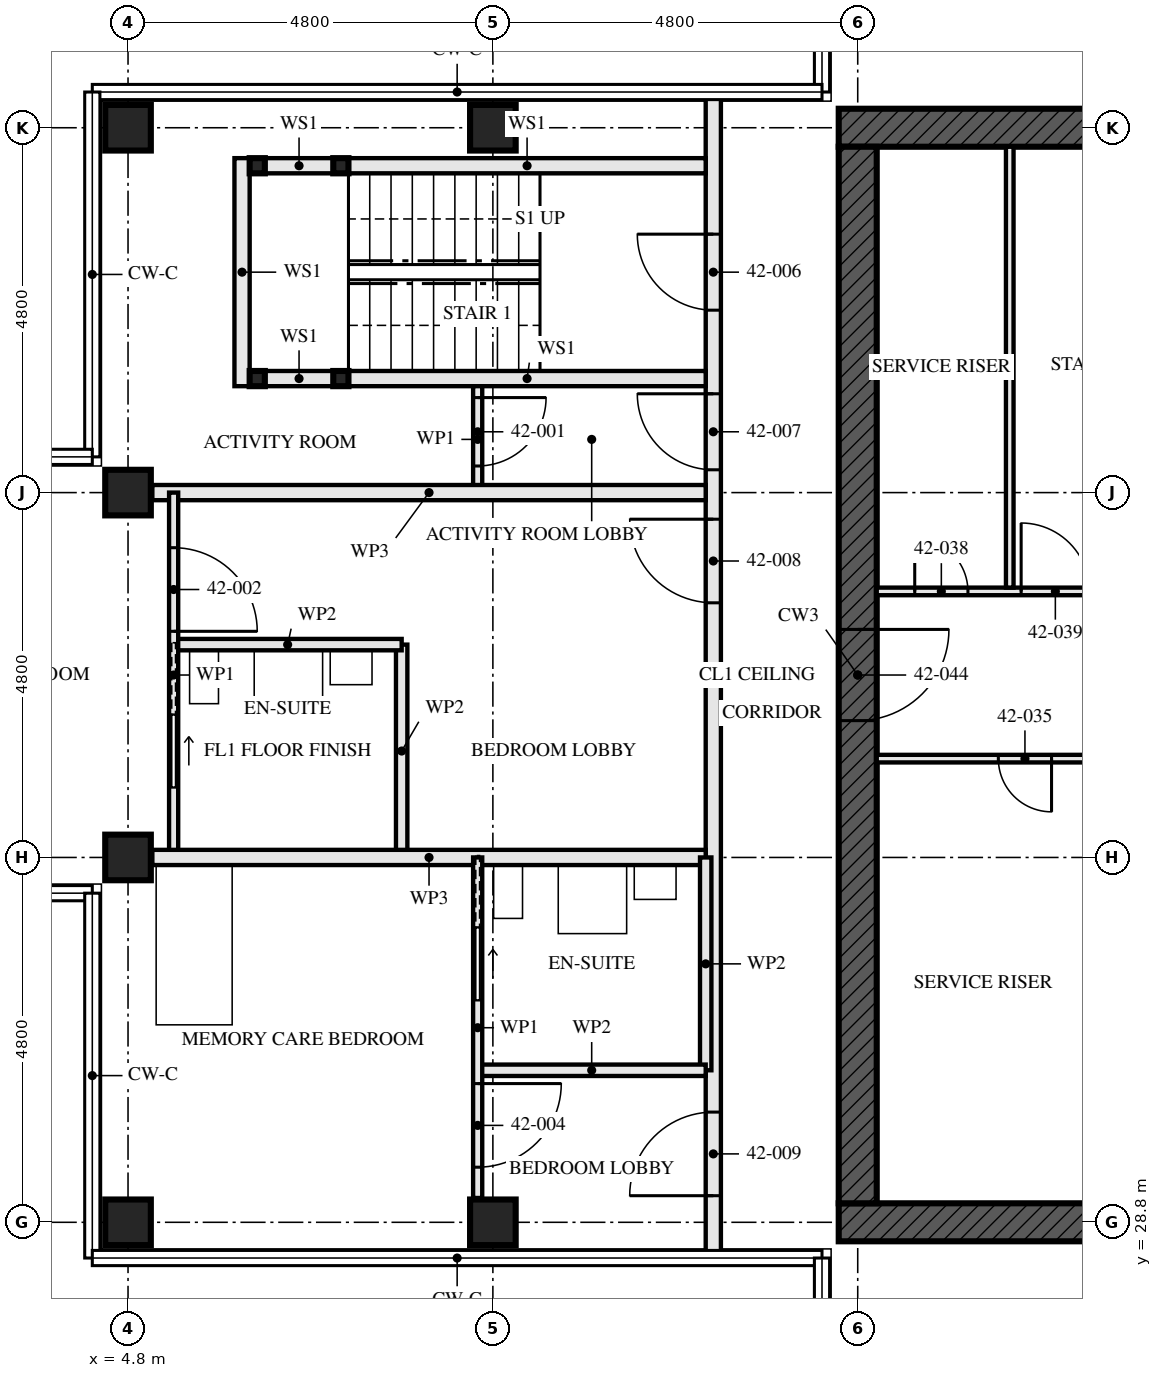
"""IFC4 building model, lengths in metres.
Left out: names, types, materials, properties, quantities, classifications, styles, units other than length and angle.
Written with IfcOpenShell. Run it as: python <this file> out.ifc"""

import sys

from ifc_helpers import new_model, si_unit, direction, frame, frame_2d, origin, origin_2d, place, context, subcontext, project, spatial, rectangle, hollow_rectangle, extrude, element, fill, save


model = new_model("IFC4")
c1 = context("Model", 3, precision=1e-05, world=origin(), true_north=direction((0.0, 1.0)))
c2 = subcontext(c1, "Body", "Model", "MODEL_VIEW")
j1 = project(units=[si_unit("LENGTHUNIT", "METRE"), si_unit("PLANEANGLEUNIT", "RADIAN")], contexts=[c1])
p1 = place(None, origin())
s1 = spatial("IfcSite", under=j1, at=p1, CompositionType="ELEMENT")
p2 = place(p1, origin())
s2 = spatial("IfcBuilding", under=s1, at=p2, CompositionType="ELEMENT")
p3 = place(p2, frame((0.0, 0.0, 155.0)))
s3 = spatial("IfcBuildingStorey", under=s2, at=p3, CompositionType="ELEMENT", Elevation=155.0)
for number, where, z_axis, x_axis in (
    (1, (4.8, 28.8, 0.0), (0.0, 0.0, 1.0), (0.0, 1.0, 0.0)),
    (2, (4.8, 33.6, 0.0), (0.0, 0.0, 1.0), (0.0, 1.0, 0.0)),
    (3, (4.8, 38.4, 0.0), (0.0, 0.0, 1.0), (0.0, 1.0, 0.0)),
    (4, (4.8, 43.2, 0.0), (0.0, 0.0, 1.0), (0.0, 1.0, 0.0)),
):
    element("IfcColumn", number, at=place(p3, frame(where, z_axis=z_axis, x_axis=x_axis)), inside=s3, PredefinedType="COLUMN", context=c2, shape_type="SweptSolid", body=[
        extrude(hollow_rectangle(XDim=0.6, YDim=0.6, WallThickness=0.06, at=origin_2d()), origin(), (0.0, 0.0, 1.0), 3.5),
    ])
for number, where, z_axis, x_axis in (
    (5, (9.6, 28.8, 0.0), (0.0, 0.0, 1.0), (0.0, 1.0, 0.0)),
    (6, (9.6, 43.2, 0.0), (0.0, 0.0, 1.0), (0.0, 1.0, 0.0)),
):
    element("IfcColumn", number, at=place(p3, frame(where, z_axis=z_axis, x_axis=x_axis)), inside=s3, PredefinedType="COLUMN", context=c2, shape_type="SweptSolid", body=[
        extrude(hollow_rectangle(XDim=0.6, YDim=0.6, WallThickness=0.08, at=origin_2d()), origin(), (0.0, 0.0, 1.0), 3.5),
    ])
p4 = place(p3, frame((14.15, 28.8, -0.17), z_axis=(0.0, 0.0, 1.0), x_axis=(1.0, 0.0, 0.0)))
e7 = element("IfcWall", 7, at=p4, inside=s3, PredefinedType="SHEAR", context=c2, shape_type="SweptSolid", body=[
    extrude(rectangle(XDim=14.9, YDim=0.5, at=frame_2d((7.45, 0.0))), origin(), (0.0, 0.0, 1.0), 3.5),
])
p5 = place(p4, frame((6.85, 0.0, 0.17)))
e8 = element("IfcOpeningElement", 8, at=p5, cuts=e7, PredefinedType="OPENING", context=c2, shape_type="SweptSolid", body=[
    extrude(rectangle(XDim=1.2, YDim=2.1, at=frame_2d((0.6, 1.05))), frame((0.0, 0.26, 0.0), z_axis=(0.0, -1.0, 0.0), x_axis=(1.0, 0.0, 0.0)), (0.0, 0.0, 1.0), 0.521),
])
p6 = place(p3, frame((29.05, 43.2, -0.17), z_axis=(0.0, 0.0, 1.0), x_axis=(-1.0, 0.0, 0.0)))
e9 = element("IfcWall", 9, at=p6, inside=s3, PredefinedType="SHEAR", context=c2, shape_type="SweptSolid", body=[
    extrude(rectangle(XDim=14.9, YDim=0.5, at=frame_2d((7.45, 0.0))), origin(), (0.0, 0.0, 1.0), 3.5),
])
p7 = place(p6, frame((6.85, 0.0, 0.17)))
e10 = element("IfcOpeningElement", 10, at=p7, cuts=e9, PredefinedType="OPENING", context=c2, shape_type="SweptSolid", body=[
    extrude(rectangle(XDim=1.2, YDim=2.1, at=frame_2d((0.6, 1.05))), frame((0.0, 0.26, 0.0), z_axis=(0.0, -1.0, 0.0), x_axis=(1.0, 0.0, 0.0)), (0.0, 0.0, 1.0), 0.521),
])
p8 = place(p3, frame((14.4, 42.95, -0.17), z_axis=(0.0, 0.0, 1.0), x_axis=(0.0, -1.0, 0.0)))
e11 = element("IfcWall", 11, at=p8, inside=s3, PredefinedType="SHEAR", context=c2, shape_type="SweptSolid", body=[
    extrude(rectangle(XDim=13.9, YDim=0.5, at=frame_2d((6.95, 0.0))), origin(), (0.0, 0.0, 1.0), 3.5),
])
p9 = place(p8, frame((6.35, 0.0, 0.17)))
e12 = element("IfcOpeningElement", 12, at=p9, cuts=e11, PredefinedType="OPENING", context=c2, shape_type="SweptSolid", body=[
    extrude(rectangle(XDim=1.2, YDim=2.1, at=frame_2d((0.6, 1.05))), frame((0.0, 0.26, 0.0), z_axis=(0.0, -1.0, 0.0), x_axis=(1.0, 0.0, 0.0)), (0.0, 0.0, 1.0), 0.521),
])
for number, where, z_axis, x_axis in (
    (13, (6.5, 42.7, 0.0), (0.0, 0.0, 1.0), (1.0, 0.0, 0.0)),
    (14, (6.5, 39.9, 0.0), (0.0, 0.0, 1.0), (1.0, 0.0, 0.0)),
    (15, (7.6, 42.7, 0.0), (0.0, 0.0, 1.0), (1.0, 0.0, 0.0)),
    (16, (7.6, 39.9, 0.0), (0.0, 0.0, 1.0), (1.0, 0.0, 0.0)),
):
    element("IfcColumn", number, at=place(p3, frame(where, z_axis=z_axis, x_axis=x_axis)), inside=s3, PredefinedType="COLUMN", context=c2, shape_type="SweptSolid", body=[
        extrude(hollow_rectangle(XDim=0.2, YDim=0.2, WallThickness=0.008, at=origin_2d()), origin(), (0.0, 0.0, 1.0), 3.33),
    ])
p10 = place(p3, frame((6.6, 42.7, 0.0), z_axis=(0.0, 0.0, 1.0), x_axis=(1.0, 0.0, 0.0)))
e17 = element("IfcWall", 17, at=p10, inside=s3, PredefinedType="SOLIDWALL", context=c2, shape_type="SweptSolid", body=[
    extrude(rectangle(XDim=0.9, YDim=0.2, at=frame_2d((0.45, 0.0))), origin(), (0.0, 0.0, 1.0), 2.99),
])
p11 = place(p3, frame((7.7, 42.7, 0.0), z_axis=(0.0, 0.0, 1.0), x_axis=(1.0, 0.0, 0.0)))
e18 = element("IfcWall", 18, at=p11, inside=s3, PredefinedType="SOLIDWALL", context=c2, shape_type="SweptSolid", body=[
    extrude(rectangle(XDim=4.7, YDim=0.2, at=frame_2d((2.35, 0.0))), origin(), (0.0, 0.0, 1.0), 2.99),
])
p12 = place(p3, frame((6.6, 39.9, 0.0), z_axis=(0.0, 0.0, 1.0), x_axis=(1.0, 0.0, 0.0)))
e19 = element("IfcWall", 19, at=p12, inside=s3, PredefinedType="SOLIDWALL", context=c2, shape_type="SweptSolid", body=[
    extrude(rectangle(XDim=0.9, YDim=0.2, at=frame_2d((0.45, 0.0))), origin(), (0.0, 0.0, 1.0), 2.99),
])
p13 = place(p3, frame((7.7, 39.9, 0.0), z_axis=(0.0, 0.0, 1.0), x_axis=(1.0, 0.0, 0.0)))
e20 = element("IfcWall", 20, at=p13, inside=s3, PredefinedType="SOLIDWALL", context=c2, shape_type="SweptSolid", body=[
    extrude(rectangle(XDim=4.7, YDim=0.2, at=frame_2d((2.35, 0.0))), origin(), (0.0, 0.0, 1.0), 2.99),
])
p14 = place(p3, frame((6.3, 42.8, 0.0), z_axis=(0.0, 0.0, 1.0), x_axis=(0.0, -1.0, 0.0)))
e21 = element("IfcWall", 21, at=p14, inside=s3, PredefinedType="SOLIDWALL", context=c2, shape_type="SweptSolid", body=[
    extrude(rectangle(XDim=3.0, YDim=0.2, at=frame_2d((1.5, 0.0))), origin(), (0.0, 0.0, 1.0), 3.33),
])
p15 = place(p3, frame((9.4, 39.8, 0.0), z_axis=(0.0, 0.0, 1.0), x_axis=(0.0, -1.0, 0.0)))
e22 = element("IfcWall", 22, at=p15, inside=s3, PredefinedType="PARTITIONING", context=c2, shape_type="SweptSolid", body=[
    extrude(rectangle(XDim=1.4, YDim=0.12, at=frame_2d((0.7, 0.0))), origin(), (0.0, 0.0, 1.0), 3.33),
])
p16 = place(p15, frame((0.15, 0.0, 0.0)))
e23 = element("IfcOpeningElement", 23, at=p16, cuts=e22, PredefinedType="OPENING", context=c2, shape_type="SweptSolid", body=[
    extrude(rectangle(XDim=0.9, YDim=2.1, at=frame_2d((0.45, 1.05))), frame((0.0, 0.071, 0.0), z_axis=(0.0, -1.0, 0.0), x_axis=(1.0, 0.0, 0.0)), (0.0, 0.0, 1.0), 0.141),
])
p17 = place(p3, frame((5.12, 38.4, 0.0), z_axis=(0.0, 0.0, 1.0), x_axis=(1.0, 0.0, 0.0)))
e24 = element("IfcWall", 24, at=p17, inside=s3, PredefinedType="PARTITIONING", context=c2, shape_type="SweptSolid", body=[
    extrude(rectangle(XDim=7.28, YDim=0.2, at=frame_2d((3.64, 0.0))), origin(), (0.0, 0.0, 1.0), 2.55),
])
p18 = place(p3, frame((5.4, 36.4, 0.0), z_axis=(0.0, 0.0, 1.0), x_axis=(1.0, 0.0, 0.0)))
e25 = element("IfcWall", 25, at=p18, inside=s3, PredefinedType="PARTITIONING", context=c2, shape_type="SweptSolid", body=[
    extrude(rectangle(XDim=3.0, YDim=0.15, at=frame_2d((1.5, 0.0))), origin(), (0.0, 0.0, 1.0), 3.33),
])
p19 = place(p3, frame((8.4, 36.4, 0.0), z_axis=(0.0, 0.0, 1.0), x_axis=(0.0, -1.0, 0.0)))
e26 = element("IfcWall", 26, at=p19, inside=s3, PredefinedType="PARTITIONING", context=c2, shape_type="SweptSolid", body=[
    extrude(rectangle(XDim=2.8, YDim=0.15, at=frame_2d((1.4, 0.0))), origin(), (0.0, 0.0, 1.0), 3.33),
])
p20 = place(p3, frame((5.4, 38.4, 0.0), z_axis=(0.0, 0.0, 1.0), x_axis=(0.0, -1.0, 0.0)))
e27 = element("IfcWall", 27, at=p20, inside=s3, PredefinedType="PARTITIONING", context=c2, shape_type="SweptSolid", body=[
    extrude(rectangle(XDim=4.8, YDim=0.12, at=frame_2d((2.4, 0.0))), origin(), (0.0, 0.0, 1.0), 3.33),
])
p21 = place(p20, frame((0.725, 0.0, 0.0)))
e28 = element("IfcOpeningElement", 28, at=p21, cuts=e27, PredefinedType="OPENING", context=c2, shape_type="SweptSolid", body=[
    extrude(rectangle(XDim=1.1, YDim=2.1, at=frame_2d((0.55, 1.05))), frame((0.0, 0.071, 0.0), z_axis=(0.0, -1.0, 0.0), x_axis=(1.0, 0.0, 0.0)), (0.0, 0.0, 1.0), 0.141),
])
p22 = place(p20, frame((2.925, 0.0, 0.0)))
e29 = element("IfcOpeningElement", 29, at=p22, cuts=e27, PredefinedType="OPENING", context=c2, shape_type="SweptSolid", body=[
    extrude(rectangle(XDim=0.95, YDim=2.1, at=frame_2d((0.475, 1.05))), frame((0.0, 0.071, 0.0), z_axis=(0.0, -1.0, 0.0), x_axis=(1.0, 0.0, 0.0)), (0.0, 0.0, 1.0), 0.141),
])
p23 = place(p3, frame((5.12, 33.6, 0.0), z_axis=(0.0, 0.0, 1.0), x_axis=(1.0, 0.0, 0.0)))
e30 = element("IfcWall", 30, at=p23, inside=s3, PredefinedType="PARTITIONING", context=c2, shape_type="SweptSolid", body=[
    extrude(rectangle(XDim=7.28, YDim=0.2, at=frame_2d((3.64, 0.0))), origin(), (0.0, 0.0, 1.0), 2.55),
])
p24 = place(p3, frame((9.4, 30.8, 0.0), z_axis=(0.0, 0.0, 1.0), x_axis=(1.0, 0.0, 0.0)))
e31 = element("IfcWall", 31, at=p24, inside=s3, PredefinedType="PARTITIONING", context=c2, shape_type="SweptSolid", body=[
    extrude(rectangle(XDim=3.0, YDim=0.15, at=frame_2d((1.5, 0.0))), origin(), (0.0, 0.0, 1.0), 3.33),
])
p25 = place(p3, frame((12.4, 33.6, 0.0), z_axis=(0.0, 0.0, 1.0), x_axis=(0.0, -1.0, 0.0)))
e32 = element("IfcWall", 32, at=p25, inside=s3, PredefinedType="PARTITIONING", context=c2, shape_type="SweptSolid", body=[
    extrude(rectangle(XDim=2.8, YDim=0.15, at=frame_2d((1.4, 0.0))), origin(), (0.0, 0.0, 1.0), 3.33),
])
p26 = place(p3, frame((9.4, 33.6, 0.0), z_axis=(0.0, 0.0, 1.0), x_axis=(0.0, -1.0, 0.0)))
e33 = element("IfcWall", 33, at=p26, inside=s3, PredefinedType="PARTITIONING", context=c2, shape_type="SweptSolid", body=[
    extrude(rectangle(XDim=4.48, YDim=0.12, at=frame_2d((2.24, 0.0))), origin(), (0.0, 0.0, 1.0), 3.33),
])
p27 = place(p26, frame((2.975, 0.0, 0.0)))
e34 = element("IfcOpeningElement", 34, at=p27, cuts=e33, PredefinedType="OPENING", context=c2, shape_type="SweptSolid", body=[
    extrude(rectangle(XDim=1.1, YDim=2.1, at=frame_2d((0.55, 1.05))), frame((0.0, 0.071, 0.0), z_axis=(0.0, -1.0, 0.0), x_axis=(1.0, 0.0, 0.0)), (0.0, 0.0, 1.0), 0.141),
])
p28 = place(p26, frame((0.925, 0.0, 0.0)))
e35 = element("IfcOpeningElement", 35, at=p28, cuts=e33, PredefinedType="OPENING", context=c2, shape_type="SweptSolid", body=[
    extrude(rectangle(XDim=0.95, YDim=2.1, at=frame_2d((0.475, 1.05))), frame((0.0, 0.071, 0.0), z_axis=(0.0, -1.0, 0.0), x_axis=(1.0, 0.0, 0.0)), (0.0, 0.0, 1.0), 0.141),
])
p29 = place(p3, frame((12.5, 43.65, 0.0), z_axis=(0.0, 0.0, 1.0), x_axis=(0.0, -1.0, 0.0)))
e36 = element("IfcWall", 36, at=p29, inside=s3, PredefinedType="PARTITIONING", context=c2, shape_type="SweptSolid", body=[
    extrude(rectangle(XDim=15.3, YDim=0.2, at=frame_2d((7.65, 0.0))), origin(), (0.0, 0.0, 1.0), 2.32),
])
p30 = place(p29, frame((1.85, 0.0, 0.0)))
e37 = element("IfcOpeningElement", 37, at=p30, cuts=e36, PredefinedType="OPENING", context=c2, shape_type="SweptSolid", body=[
    extrude(rectangle(XDim=1.0, YDim=2.1, at=frame_2d((0.5, 1.05))), frame((0.0, 0.111, 0.0), z_axis=(0.0, -1.0, 0.0), x_axis=(1.0, 0.0, 0.0)), (0.0, 0.0, 1.0), 0.221),
])
p31 = place(p29, frame((3.95, 0.0, 0.0)))
e38 = element("IfcOpeningElement", 38, at=p31, cuts=e36, PredefinedType="OPENING", context=c2, shape_type="SweptSolid", body=[
    extrude(rectangle(XDim=1.0, YDim=2.1, at=frame_2d((0.5, 1.05))), frame((0.0, 0.111, 0.0), z_axis=(0.0, -1.0, 0.0), x_axis=(1.0, 0.0, 0.0)), (0.0, 0.0, 1.0), 0.221),
])
p32 = place(p29, frame((5.6, 0.0, 0.0)))
e39 = element("IfcOpeningElement", 39, at=p32, cuts=e36, PredefinedType="OPENING", context=c2, shape_type="SweptSolid", body=[
    extrude(rectangle(XDim=1.1, YDim=2.1, at=frame_2d((0.55, 1.05))), frame((0.0, 0.111, 0.0), z_axis=(0.0, -1.0, 0.0), x_axis=(1.0, 0.0, 0.0)), (0.0, 0.0, 1.0), 0.221),
])
p33 = place(p29, frame((13.4, 0.0, 0.0)))
e40 = element("IfcOpeningElement", 40, at=p33, cuts=e36, PredefinedType="OPENING", context=c2, shape_type="SweptSolid", body=[
    extrude(rectangle(XDim=1.1, YDim=2.1, at=frame_2d((0.55, 1.05))), frame((0.0, 0.111, 0.0), z_axis=(0.0, -1.0, 0.0), x_axis=(1.0, 0.0, 0.0)), (0.0, 0.0, 1.0), 0.221),
])
p34 = place(p3, frame((16.4, 37.15, 0.0), z_axis=(0.0, 0.0, 1.0), x_axis=(0.0, 1.0, 0.0)))
e41 = element("IfcWall", 41, at=p34, inside=s3, PredefinedType="SOLIDWALL", context=c2, shape_type="SweptSolid", body=[
    extrude(rectangle(XDim=5.8, YDim=0.1, at=frame_2d((2.9, 0.0))), origin(), (0.0, 0.0, 1.0), 3.33),
])
p35 = place(p3, frame((14.65, 34.9, 0.0), z_axis=(0.0, 0.0, 1.0), x_axis=(1.0, 0.0, 0.0)))
e42 = element("IfcWall", 42, at=p35, inside=s3, PredefinedType="SOLIDWALL", context=c2, shape_type="SweptSolid", body=[
    extrude(rectangle(XDim=5.9, YDim=0.1, at=frame_2d((2.95, 0.0))), origin(), (0.0, 0.0, 1.0), 3.33),
])
p36 = place(p35, frame((1.6, 0.0, 0.0)))
e43 = element("IfcOpeningElement", 43, at=p36, cuts=e42, PredefinedType="OPENING", context=c2, shape_type="SweptSolid", body=[
    extrude(rectangle(XDim=0.7, YDim=2.1, at=frame_2d((0.35, 1.05))), frame((0.0, 0.061, 0.0), z_axis=(0.0, -1.0, 0.0), x_axis=(1.0, 0.0, 0.0)), (0.0, 0.0, 1.0), 0.121),
])
p37 = place(p3, frame((14.65, 37.1, 0.0), z_axis=(0.0, 0.0, 1.0), x_axis=(1.0, 0.0, 0.0)))
e44 = element("IfcWall", 44, at=p37, inside=s3, PredefinedType="SOLIDWALL", context=c2, shape_type="SweptSolid", body=[
    extrude(rectangle(XDim=5.9, YDim=0.1, at=frame_2d((2.95, 0.0))), origin(), (0.0, 0.0, 1.0), 3.33),
])
p38 = place(p37, frame((0.5, 0.0, 0.0)))
e45 = element("IfcOpeningElement", 45, at=p38, cuts=e44, PredefinedType="OPENING", context=c2, shape_type="SweptSolid", body=[
    extrude(rectangle(XDim=0.7, YDim=2.1, at=frame_2d((0.35, 1.05))), frame((0.0, 0.061, 0.0), z_axis=(0.0, -1.0, 0.0), x_axis=(1.0, 0.0, 0.0)), (0.0, 0.0, 1.0), 0.121),
])
p39 = place(p37, frame((1.9, 0.0, 0.0)))
e46 = element("IfcOpeningElement", 46, at=p39, cuts=e44, PredefinedType="OPENING", context=c2, shape_type="SweptSolid", body=[
    extrude(rectangle(XDim=0.9, YDim=2.1, at=frame_2d((0.45, 1.05))), frame((0.0, 0.061, 0.0), z_axis=(0.0, -1.0, 0.0), x_axis=(1.0, 0.0, 0.0)), (0.0, 0.0, 1.0), 0.121),
])
p40 = place(p16, origin())
e47 = element("IfcDoor", 47, at=p40, inside=s3, OperationType="SINGLE_SWING_RIGHT", PredefinedType="DOOR", context=c2, shape_type="SweptSolid", body=[
    extrude(rectangle(XDim=0.9, YDim=2.1, at=frame_2d((0.45, 1.05))), frame((0.0, 0.022, 0.0), z_axis=(0.0, -1.0, 0.0), x_axis=(1.0, 0.0, 0.0)), (0.0, 0.0, 1.0), 0.044),
])
fill(e23, e47)
p41 = place(p21, origin())
e48 = element("IfcDoor", 48, at=p41, inside=s3, OperationType="SINGLE_SWING_LEFT", PredefinedType="DOOR", context=c2, shape_type="SweptSolid", body=[
    extrude(rectangle(XDim=1.1, YDim=2.1, at=frame_2d((0.55, 1.05))), frame((0.0, 0.022, 0.0), z_axis=(0.0, -1.0, 0.0), x_axis=(1.0, 0.0, 0.0)), (0.0, 0.0, 1.0), 0.044),
])
fill(e28, e48)
p42 = place(p22, origin())
e49 = element("IfcDoor", 49, at=p42, inside=s3, OperationType="SLIDING_TO_RIGHT", PredefinedType="DOOR", context=c2, shape_type="SweptSolid", body=[
    extrude(rectangle(XDim=0.95, YDim=2.1, at=frame_2d((0.475, 1.05))), frame((0.0, 0.022, 0.0), z_axis=(0.0, -1.0, 0.0), x_axis=(1.0, 0.0, 0.0)), (0.0, 0.0, 1.0), 0.044),
])
fill(e29, e49)
p43 = place(p27, origin())
e50 = element("IfcDoor", 50, at=p43, inside=s3, OperationType="SINGLE_SWING_RIGHT", PredefinedType="DOOR", context=c2, shape_type="SweptSolid", body=[
    extrude(rectangle(XDim=1.1, YDim=2.1, at=frame_2d((0.55, 1.05))), frame((0.0, 0.022, 0.0), z_axis=(0.0, -1.0, 0.0), x_axis=(1.0, 0.0, 0.0)), (0.0, 0.0, 1.0), 0.044),
])
fill(e34, e50)
p44 = place(p28, origin())
e51 = element("IfcDoor", 51, at=p44, inside=s3, OperationType="SLIDING_TO_RIGHT", PredefinedType="DOOR", context=c2, shape_type="SweptSolid", body=[
    extrude(rectangle(XDim=0.95, YDim=2.1, at=frame_2d((0.475, 1.05))), frame((0.0, 0.022, 0.0), z_axis=(0.0, -1.0, 0.0), x_axis=(1.0, 0.0, 0.0)), (0.0, 0.0, 1.0), 0.044),
])
fill(e35, e51)
p45 = place(p30, frame((1.0, 0.0, 0.0), z_axis=(0.0, 0.0, 1.0), x_axis=(-1.0, 0.0, 0.0)))
e52 = element("IfcDoor", 52, at=p45, inside=s3, OperationType="SINGLE_SWING_LEFT", PredefinedType="DOOR", context=c2, shape_type="SweptSolid", body=[
    extrude(rectangle(XDim=1.0, YDim=2.1, at=frame_2d((0.5, 1.05))), frame((0.0, 0.032, 0.0), z_axis=(0.0, -1.0, 0.0), x_axis=(1.0, 0.0, 0.0)), (0.0, 0.0, 1.0), 0.064),
])
fill(e37, e52)
p46 = place(p31, frame((1.0, 0.0, 0.0), z_axis=(0.0, 0.0, 1.0), x_axis=(-1.0, 0.0, 0.0)))
e53 = element("IfcDoor", 53, at=p46, inside=s3, OperationType="SINGLE_SWING_LEFT", PredefinedType="DOOR", context=c2, shape_type="SweptSolid", body=[
    extrude(rectangle(XDim=1.0, YDim=2.1, at=frame_2d((0.5, 1.05))), frame((0.0, 0.027, 0.0), z_axis=(0.0, -1.0, 0.0), x_axis=(1.0, 0.0, 0.0)), (0.0, 0.0, 1.0), 0.054),
])
fill(e38, e53)
p47 = place(p32, frame((1.1, 0.0, 0.0), z_axis=(0.0, 0.0, 1.0), x_axis=(-1.0, 0.0, 0.0)))
e54 = element("IfcDoor", 54, at=p47, inside=s3, OperationType="SINGLE_SWING_LEFT", PredefinedType="DOOR", context=c2, shape_type="SweptSolid", body=[
    extrude(rectangle(XDim=1.1, YDim=2.1, at=frame_2d((0.55, 1.05))), frame((0.0, 0.027, 0.0), z_axis=(0.0, -1.0, 0.0), x_axis=(1.0, 0.0, 0.0)), (0.0, 0.0, 1.0), 0.054),
])
fill(e39, e54)
p48 = place(p33, frame((1.1, 0.0, 0.0), z_axis=(0.0, 0.0, 1.0), x_axis=(-1.0, 0.0, 0.0)))
e55 = element("IfcDoor", 55, at=p48, inside=s3, OperationType="SINGLE_SWING_RIGHT", PredefinedType="DOOR", context=c2, shape_type="SweptSolid", body=[
    extrude(rectangle(XDim=1.1, YDim=2.1, at=frame_2d((0.55, 1.05))), frame((0.0, 0.027, 0.0), z_axis=(0.0, -1.0, 0.0), x_axis=(1.0, 0.0, 0.0)), (0.0, 0.0, 1.0), 0.054),
])
fill(e40, e55)
p49 = place(p36, frame((0.7, 0.0, 0.0), z_axis=(0.0, 0.0, 1.0), x_axis=(-1.0, 0.0, 0.0)))
e56 = element("IfcDoor", 56, at=p49, inside=s3, OperationType="SINGLE_SWING_RIGHT", PredefinedType="DOOR", context=c2, shape_type="SweptSolid", body=[
    extrude(rectangle(XDim=0.7, YDim=2.1, at=frame_2d((0.35, 1.05))), frame((0.0, 0.027, 0.0), z_axis=(0.0, -1.0, 0.0), x_axis=(1.0, 0.0, 0.0)), (0.0, 0.0, 1.0), 0.054),
])
fill(e43, e56)
p50 = place(p38, origin())
e57 = element("IfcDoor", 57, at=p50, inside=s3, OperationType="SINGLE_SWING_RIGHT", PredefinedType="DOOR", context=c2, shape_type="SweptSolid", body=[
    extrude(rectangle(XDim=0.7, YDim=2.1, at=frame_2d((0.35, 1.05))), frame((0.0, 0.027, 0.0), z_axis=(0.0, -1.0, 0.0), x_axis=(1.0, 0.0, 0.0)), (0.0, 0.0, 1.0), 0.054),
])
fill(e45, e57)
p51 = place(p39, origin())
e58 = element("IfcDoor", 58, at=p51, inside=s3, OperationType="SINGLE_SWING_RIGHT", PredefinedType="DOOR", context=c2, shape_type="SweptSolid", body=[
    extrude(rectangle(XDim=0.9, YDim=2.1, at=frame_2d((0.45, 1.05))), frame((0.0, 0.027, 0.0), z_axis=(0.0, -1.0, 0.0), x_axis=(1.0, 0.0, 0.0)), (0.0, 0.0, 1.0), 0.054),
])
fill(e46, e58)
p52 = place(p9, origin())
e59 = element("IfcDoor", 59, at=p52, inside=s3, OperationType="SINGLE_SWING_LEFT", PredefinedType="DOOR", context=c2, shape_type="SweptSolid", body=[
    extrude(rectangle(XDim=1.2, YDim=2.1, at=frame_2d((0.6, 1.05))), frame((0.0, 0.027, 0.0), z_axis=(0.0, -1.0, 0.0), x_axis=(1.0, 0.0, 0.0)), (0.0, 0.0, 1.0), 0.054),
])
fill(e12, e59)
save(model, sys.argv[1])
